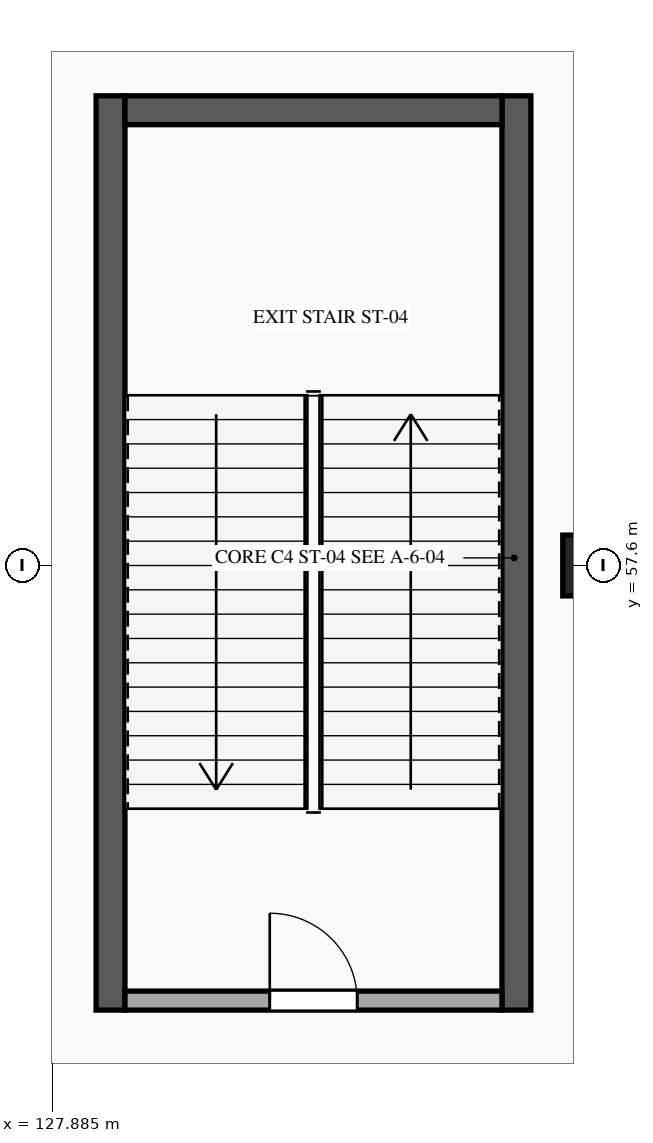
"""IFC4 building model, lengths in metres.
Left out: names, types, materials, properties, quantities, classifications, styles, units other than length and angle.
Written with IfcOpenShell. Run it as: python <this file> out.ifc"""

import sys

from ifc_helpers import new_model, si_unit, direction, frame, frame_2d, origin, origin_2d, place, context, subcontext, project, spatial, rectangle, extrude, element, fill, save


model = new_model("IFC4")
c1 = context("Model", 3, precision=1e-05, world=origin(), true_north=direction((0.0, 1.0)))
c2 = subcontext(c1, "Body", "Model", "MODEL_VIEW")
j1 = project(units=[si_unit("LENGTHUNIT", "METRE"), si_unit("PLANEANGLEUNIT", "RADIAN")], contexts=[c1])
p1 = place(None, origin())
s1 = spatial("IfcSite", under=j1, at=p1, CompositionType="ELEMENT")
p2 = place(p1, origin())
s2 = spatial("IfcBuilding", under=s1, at=p2, CompositionType="ELEMENT")
p3 = place(p2, frame((0.0, 0.0, -5.4)))
s3 = spatial("IfcBuildingStorey", under=s2, at=p3, CompositionType="ELEMENT", Elevation=-5.4)
p4 = place(p3, frame((135.0, 57.6, 0.0), z_axis=(0.0, 0.0, 1.0), x_axis=(1.0, 0.0, 0.0)))
e1 = element("IfcColumn", 1, at=p4, inside=s3, PredefinedType="COLUMN", context=c2, shape_type="SweptSolid", body=[
    extrude(rectangle(XDim=0.8, YDim=0.8, at=origin_2d()), origin(), (0.0, 0.0, 1.0), 5.4),
])
for number, where, z_axis, x_axis in (
    (2, (128.65, 51.75, 0.0), (0.0, 0.0, 1.0), (0.0, 1.0, 0.0)),
    (3, (133.99, 63.78, 0.0), (0.0, 0.0, 1.0), (0.0, -1.0, 0.0)),
):
    element("IfcWall", number, at=place(p3, frame(where, z_axis=z_axis, x_axis=x_axis)), inside=s3, PredefinedType="SHEAR", context=c2, shape_type="SweptSolid", body=[
        extrude(rectangle(XDim=12.03, YDim=0.38, at=frame_2d((6.015, 0.0))), origin(), (0.0, 0.0, 1.0), 5.08),
    ])
p5 = place(p3, frame((128.84, 63.59, 0.0), z_axis=(0.0, 0.0, 1.0), x_axis=(1.0, 0.0, 0.0)))
e4 = element("IfcWall", 4, at=p5, inside=s3, PredefinedType="SHEAR", context=c2, shape_type="SweptSolid", body=[
    extrude(rectangle(XDim=4.96, YDim=0.38, at=frame_2d((2.48, 0.0))), origin(), (0.0, 0.0, 1.0), 5.08),
])
p6 = place(p3, frame((128.84, 51.875, 0.0), z_axis=(0.0, 0.0, 1.0), x_axis=(1.0, 0.0, 0.0)))
e5 = element("IfcWall", 5, at=p6, inside=s3, PredefinedType="STANDARD", context=c2, shape_type="SweptSolid", body=[
    extrude(rectangle(XDim=4.96, YDim=0.25, at=frame_2d((2.48, 0.0))), origin(), (0.0, 0.0, 1.0), 4.95),
])
p7 = place(p6, frame((1.905, 0.0, 0.0)))
e6 = element("IfcOpeningElement", 6, at=p7, cuts=e5, PredefinedType="OPENING", context=c2, shape_type="SweptSolid", body=[
    extrude(rectangle(XDim=1.15, YDim=2.2, at=frame_2d((0.575, 1.1))), frame((0.0, 0.135, 0.0), z_axis=(0.0, -1.0, 0.0), x_axis=(1.0, 0.0, 0.0)), (0.0, 0.0, 1.0), 0.27),
])
p8 = place(p7, origin())
e7 = element("IfcDoor", 7, at=p8, inside=s3, OperationType="SINGLE_SWING_LEFT", PredefinedType="DOOR", context=c2, shape_type="SweptSolid", body=[
    extrude(rectangle(XDim=1.15, YDim=2.2, at=frame_2d((0.575, 1.1))), frame((0.0, 0.025, 0.0), z_axis=(0.0, -1.0, 0.0), x_axis=(1.0, 0.0, 0.0)), (0.0, 0.0, 1.0), 0.05),
])
fill(e6, e7)
save(model, sys.argv[1])
